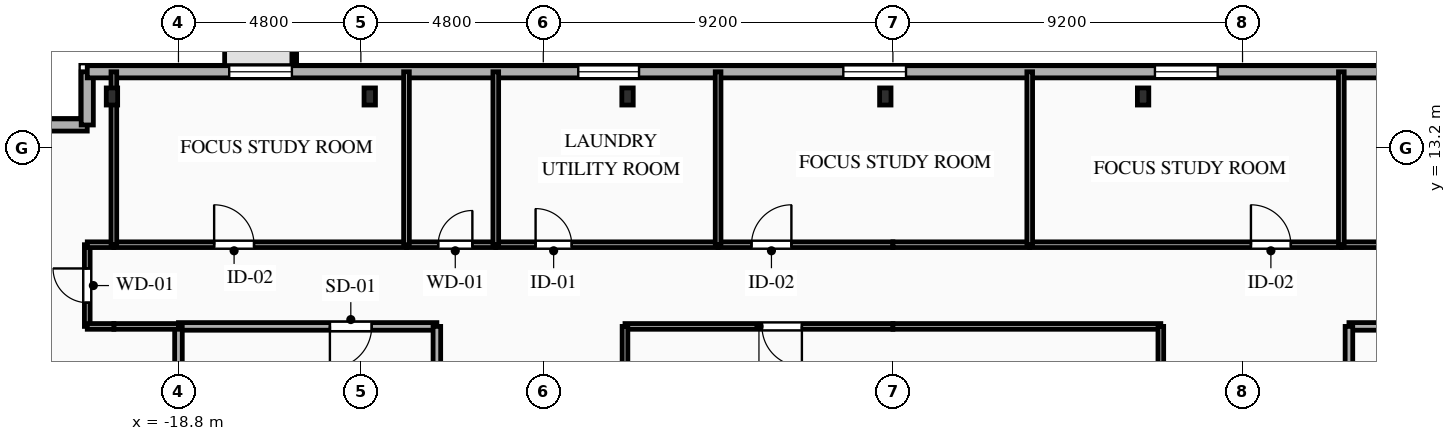
"""IFC4 building model, lengths in metres.
Left out: names, types, materials, properties, quantities, classifications, styles, units other than length and angle.
Written with IfcOpenShell. Run it as: python <this file> out.ifc"""

import sys

from ifc_helpers import new_model, si_unit, direction, frame, frame_2d, origin, origin_2d, place, context, subcontext, project, spatial, rectangle, i_section, extrude, element, fill, save


model = new_model("IFC4")
c1 = context("Model", 3, precision=1e-05, world=origin(), true_north=direction((0.0, 1.0)))
c2 = subcontext(c1, "Body", "Model", "MODEL_VIEW")
j1 = project(units=[si_unit("LENGTHUNIT", "METRE"), si_unit("PLANEANGLEUNIT", "RADIAN")], contexts=[c1])
p1 = place(None, origin())
s1 = spatial("IfcSite", under=j1, at=p1, CompositionType="ELEMENT")
p2 = place(p1, origin())
s2 = spatial("IfcBuilding", under=s1, at=p2, CompositionType="ELEMENT")
p3 = place(p2, frame((0.0, 0.0, 251.75)))
s3 = spatial("IfcBuildingStorey", under=s2, at=p3, CompositionType="ELEMENT", Elevation=251.75)
for number, where, z_axis, x_axis in (
    (1, (6.583, 14.55, 0.0), (0.0, 0.0, 1.0), (1.0, 0.0, 0.0)),
    (2, (-0.2, 14.55, 0.0), (0.0, 0.0, 1.0), (1.0, 0.0, 0.0)),
    (3, (-6.983, 14.55, 0.0), (0.0, 0.0, 1.0), (1.0, 0.0, 0.0)),
    (4, (-13.767, 14.55, 0.0), (0.0, 0.0, 1.0), (1.0, 0.0, 0.0)),
    (5, (-20.55, 14.55, 0.0), (0.0, 0.0, 1.0), (1.0, 0.0, 0.0)),
):
    element("IfcColumn", number, at=place(p3, frame(where, z_axis=z_axis, x_axis=x_axis)), inside=s3, PredefinedType="COLUMN", context=c2, shape_type="SweptSolid", body=[
        extrude(i_section(OverallWidth=0.3, OverallDepth=0.45, WebThickness=0.014, FlangeThickness=0.026, FilletRadius=0.027, at=origin_2d()), origin(), (0.0, 0.0, 1.0), 3.35),
    ])
p4 = place(p3, frame((-22.6, 13.8, 0.0), z_axis=(0.0, 0.0, 1.0), x_axis=(1.0, 0.0, 0.0)))
e6 = element("IfcWall", 6, at=p4, inside=s3, PredefinedType="SOLIDWALL", context=c2, shape_type="SweptSolid", body=[
    extrude(rectangle(XDim=1.4, YDim=0.32, at=frame_2d((0.7, 0.0))), origin(), (0.0, 0.0, 1.0), 3.04),
])
p5 = place(p3, frame((-21.2, 13.8, 0.0), z_axis=(0.0, 0.0, 1.0), x_axis=(0.0, 1.0, 0.0)))
e7 = element("IfcWall", 7, at=p5, inside=s3, PredefinedType="SOLIDWALL", context=c2, shape_type="SweptSolid", body=[
    extrude(rectangle(XDim=1.4, YDim=0.32, at=frame_2d((0.7, 0.0))), origin(), (0.0, 0.0, 1.0), 3.04),
])
p6 = place(p3, frame((-21.2, 15.2, 0.0), z_axis=(0.0, 0.0, 1.0), x_axis=(1.0, 0.0, 0.0)))
e8 = element("IfcWall", 8, at=p6, inside=s3, PredefinedType="SOLIDWALL", context=c2, shape_type="SweptSolid", body=[
    extrude(rectangle(XDim=42.0, YDim=0.32, at=frame_2d((21.0, 0.0))), origin(), (0.0, 0.0, 1.0), 3.04),
])
p7 = place(p6, frame((3.735, 0.0, 0.85)))
e9 = element("IfcOpeningElement", 9, at=p7, cuts=e8, PredefinedType="OPENING", context=c2, shape_type="SweptSolid", body=[
    extrude(rectangle(XDim=1.65, YDim=1.85, at=frame_2d((0.825, 0.925))), frame((0.0, 0.17, 0.0), z_axis=(0.0, -1.0, 0.0), x_axis=(1.0, 0.0, 0.0)), (0.0, 0.0, 1.0), 0.34),
])
p8 = place(p6, frame((12.92, 0.0, 0.85)))
e10 = element("IfcOpeningElement", 10, at=p8, cuts=e8, PredefinedType="OPENING", context=c2, shape_type="SweptSolid", body=[
    extrude(rectangle(XDim=1.6, YDim=1.85, at=frame_2d((0.8, 0.925))), frame((0.0, 0.17, 0.0), z_axis=(0.0, -1.0, 0.0), x_axis=(1.0, 0.0, 0.0)), (0.0, 0.0, 1.0), 0.34),
])
p9 = place(p6, frame((19.895, 0.0, 0.85)))
e11 = element("IfcOpeningElement", 11, at=p9, cuts=e8, PredefinedType="OPENING", context=c2, shape_type="SweptSolid", body=[
    extrude(rectangle(XDim=1.65, YDim=1.85, at=frame_2d((0.825, 0.925))), frame((0.0, 0.17, 0.0), z_axis=(0.0, -1.0, 0.0), x_axis=(1.0, 0.0, 0.0)), (0.0, 0.0, 1.0), 0.34),
])
p10 = place(p6, frame((28.095, 0.0, 0.85)))
e12 = element("IfcOpeningElement", 12, at=p10, cuts=e8, PredefinedType="OPENING", context=c2, shape_type="SweptSolid", body=[
    extrude(rectangle(XDim=1.65, YDim=1.85, at=frame_2d((0.825, 0.925))), frame((0.0, 0.17, 0.0), z_axis=(0.0, -1.0, 0.0), x_axis=(1.0, 0.0, 0.0)), (0.0, 0.0, 1.0), 0.34),
])
p11 = place(p6, frame((36.495, 0.0, 0.85)))
e13 = element("IfcOpeningElement", 13, at=p11, cuts=e8, PredefinedType="OPENING", context=c2, shape_type="SweptSolid", body=[
    extrude(rectangle(XDim=1.65, YDim=1.85, at=frame_2d((0.825, 0.925))), frame((0.0, 0.17, 0.0), z_axis=(0.0, -1.0, 0.0), x_axis=(1.0, 0.0, 0.0)), (0.0, 0.0, 1.0), 0.34),
])
p12 = place(p3, frame((-12.0, 8.5, 0.0), z_axis=(0.0, 0.0, 1.0), x_axis=(-1.0, 0.0, 0.0)))
e14 = element("IfcWall", 14, at=p12, inside=s3, PredefinedType="PARTITIONING", context=c2, shape_type="SweptSolid", body=[
    extrude(rectangle(XDim=6.8, YDim=0.2, at=frame_2d((3.4, 0.0))), origin(), (0.0, 0.0, 1.0), 3.04),
])
p13 = place(p12, frame((1.715, 0.0, 0.0)))
e15 = element("IfcOpeningElement", 15, at=p13, cuts=e14, PredefinedType="OPENING", context=c2, shape_type="SweptSolid", body=[
    extrude(rectangle(XDim=1.1, YDim=2.15, at=frame_2d((0.55, 1.075))), frame((0.0, 0.11, 0.0), z_axis=(0.0, -1.0, 0.0), x_axis=(1.0, 0.0, 0.0)), (0.0, 0.0, 1.0), 0.22),
])
p14 = place(p3, frame((-12.0, 5.6, 0.0), z_axis=(0.0, 0.0, 1.0), x_axis=(0.0, 1.0, 0.0)))
e16 = element("IfcWall", 16, at=p14, inside=s3, PredefinedType="PARTITIONING", context=c2, shape_type="SweptSolid", body=[
    extrude(rectangle(XDim=2.9, YDim=0.2, at=frame_2d((1.45, 0.0))), origin(), (0.0, 0.0, 1.0), 3.04),
])
p15 = place(p3, frame((-18.8, 8.5, 0.0), z_axis=(0.0, 0.0, 1.0), x_axis=(0.0, -1.0, 0.0)))
e17 = element("IfcWall", 17, at=p15, inside=s3, PredefinedType="PARTITIONING", context=c2, shape_type="SweptSolid", body=[
    extrude(rectangle(XDim=2.9, YDim=0.2, at=frame_2d((1.45, 0.0))), origin(), (0.0, 0.0, 1.0), 2.665),
])
p16 = place(p3, frame((18.8, 8.5, 0.0), z_axis=(0.0, 0.0, 1.0), x_axis=(-1.0, 0.0, 0.0)))
e18 = element("IfcWall", 18, at=p16, inside=s3, PredefinedType="PARTITIONING", context=c2, shape_type="SweptSolid", body=[
    extrude(rectangle(XDim=6.8, YDim=0.2, at=frame_2d((3.4, 0.0))), origin(), (0.0, 0.0, 1.0), 3.04),
])
p17 = place(p16, frame((3.985, 0.0, 0.0)))
e19 = element("IfcOpeningElement", 19, at=p17, cuts=e18, PredefinedType="OPENING", context=c2, shape_type="SweptSolid", body=[
    extrude(rectangle(XDim=1.1, YDim=2.15, at=frame_2d((0.55, 1.075))), frame((0.0, 0.11, 0.0), z_axis=(0.0, -1.0, 0.0), x_axis=(1.0, 0.0, 0.0)), (0.0, 0.0, 1.0), 0.22),
])
p18 = place(p3, frame((12.0, 8.5, 0.0), z_axis=(0.0, 0.0, 1.0), x_axis=(0.0, -1.0, 0.0)))
e20 = element("IfcWall", 20, at=p18, inside=s3, PredefinedType="PARTITIONING", context=c2, shape_type="SweptSolid", body=[
    extrude(rectangle(XDim=2.9, YDim=0.2, at=frame_2d((1.45, 0.0))), origin(), (0.0, 0.0, 1.0), 3.04),
])
p19 = place(p3, frame((-21.2, 8.5, 0.0), z_axis=(0.0, 0.0, 1.0), x_axis=(0.0, 1.0, 0.0)))
e21 = element("IfcWall", 21, at=p19, inside=s3, PredefinedType="PARTITIONING", context=c2, shape_type="SweptSolid", body=[
    extrude(rectangle(XDim=2.15, YDim=0.15, at=frame_2d((1.075, 0.0))), origin(), (0.0, 0.0, 1.0), 2.695),
])
p20 = place(p19, frame((0.625, 0.0, 0.0)))
e22 = element("IfcOpeningElement", 22, at=p20, cuts=e21, PredefinedType="OPENING", context=c2, shape_type="SweptSolid", body=[
    extrude(rectangle(XDim=0.9, YDim=2.1, at=frame_2d((0.45, 1.05))), frame((0.0, 0.085, 0.0), z_axis=(0.0, -1.0, 0.0), x_axis=(1.0, 0.0, 0.0)), (0.0, 0.0, 1.0), 0.17),
])
p21 = place(p3, frame((-18.8, 8.5, 0.0), z_axis=(0.0, 0.0, 1.0), x_axis=(-1.0, 0.0, 0.0)))
e23 = element("IfcWall", 23, at=p21, inside=s3, PredefinedType="PARTITIONING", context=c2, shape_type="SweptSolid", body=[
    extrude(rectangle(XDim=1.7, YDim=0.15, at=frame_2d((0.85, 0.0))), origin(), (0.0, 0.0, 1.0), 3.04),
])
for number, where, z_axis, x_axis in (
    (24, (-20.5, 8.5, 0.0), (0.0, 0.0, 1.0), (-1.0, 0.0, 0.0)),
    (25, (-21.2, 10.65, 0.0), (0.0, 0.0, 1.0), (1.0, 0.0, 0.0)),
):
    element("IfcWall", number, at=place(p3, frame(where, z_axis=z_axis, x_axis=x_axis)), inside=s3, PredefinedType="PARTITIONING", context=c2, shape_type="SweptSolid", body=[
        extrude(rectangle(XDim=0.7, YDim=0.15, at=frame_2d((0.35, 0.0))), origin(), (0.0, 0.0, 1.0), 3.04),
    ])
p22 = place(p3, frame((-20.5, 10.65, 0.0), z_axis=(0.0, 0.0, 1.0), x_axis=(1.0, 0.0, 0.0)))
e26 = element("IfcWall", 26, at=p22, inside=s3, PredefinedType="PARTITIONING", context=c2, shape_type="SweptSolid", body=[
    extrude(rectangle(XDim=7.7, YDim=0.15, at=frame_2d((3.85, 0.0))), origin(), (0.0, 0.0, 1.0), 3.04),
])
p23 = place(p22, frame((2.639, 0.0, 0.0)))
e27 = element("IfcOpeningElement", 27, at=p23, cuts=e26, PredefinedType="OPENING", context=c2, shape_type="SweptSolid", body=[
    extrude(rectangle(XDim=1.05, YDim=2.15, at=frame_2d((0.525, 1.075))), frame((0.0, 0.085, 0.0), z_axis=(0.0, -1.0, 0.0), x_axis=(1.0, 0.0, 0.0)), (0.0, 0.0, 1.0), 0.17),
])
p24 = place(p3, frame((-12.8, 10.65, 0.0), z_axis=(0.0, 0.0, 1.0), x_axis=(1.0, 0.0, 0.0)))
e28 = element("IfcWall", 28, at=p24, inside=s3, PredefinedType="PLUMBINGWALL", context=c2, shape_type="SweptSolid", body=[
    extrude(rectangle(XDim=2.35, YDim=0.15, at=frame_2d((1.175, 0.0))), origin(), (0.0, 0.0, 1.0), 3.04),
])
p25 = place(p24, frame((0.834, 0.0, 0.0)))
e29 = element("IfcOpeningElement", 29, at=p25, cuts=e28, PredefinedType="OPENING", context=c2, shape_type="SweptSolid", body=[
    extrude(rectangle(XDim=0.9, YDim=2.1, at=frame_2d((0.45, 1.05))), frame((0.0, 0.085, 0.0), z_axis=(0.0, -1.0, 0.0), x_axis=(1.0, 0.0, 0.0)), (0.0, 0.0, 1.0), 0.17),
])
p26 = place(p3, frame((-10.45, 10.65, 0.0), z_axis=(0.0, 0.0, 1.0), x_axis=(1.0, 0.0, 0.0)))
e30 = element("IfcWall", 30, at=p26, inside=s3, PredefinedType="PARTITIONING", context=c2, shape_type="SweptSolid", body=[
    extrude(rectangle(XDim=5.85, YDim=0.15, at=frame_2d((2.925, 0.0))), origin(), (0.0, 0.0, 1.0), 3.04),
])
p27 = place(p26, frame((1.048, 0.0, 0.0)))
e31 = element("IfcOpeningElement", 31, at=p27, cuts=e30, PredefinedType="OPENING", context=c2, shape_type="SweptSolid", body=[
    extrude(rectangle(XDim=0.95, YDim=2.1, at=frame_2d((0.475, 1.05))), frame((0.0, 0.085, 0.0), z_axis=(0.0, -1.0, 0.0), x_axis=(1.0, 0.0, 0.0)), (0.0, 0.0, 1.0), 0.17),
])
p28 = place(p3, frame((-4.6, 10.65, 0.0), z_axis=(0.0, 0.0, 1.0), x_axis=(1.0, 0.0, 0.0)))
e32 = element("IfcWall", 32, at=p28, inside=s3, PredefinedType="PARTITIONING", context=c2, shape_type="SweptSolid", body=[
    extrude(rectangle(XDim=4.6, YDim=0.15, at=frame_2d((2.3, 0.0))), origin(), (0.0, 0.0, 1.0), 3.04),
])
p29 = place(p28, frame((0.879, 0.0, 0.0)))
e33 = element("IfcOpeningElement", 33, at=p29, cuts=e32, PredefinedType="OPENING", context=c2, shape_type="SweptSolid", body=[
    extrude(rectangle(XDim=1.05, YDim=2.15, at=frame_2d((0.525, 1.075))), frame((0.0, 0.085, 0.0), z_axis=(0.0, -1.0, 0.0), x_axis=(1.0, 0.0, 0.0)), (0.0, 0.0, 1.0), 0.17),
])
p30 = place(p3, frame((0.0, 8.5, 0.0), z_axis=(0.0, 0.0, 1.0), x_axis=(-1.0, 0.0, 0.0)))
e34 = element("IfcWall", 34, at=p30, inside=s3, PredefinedType="PARTITIONING", context=c2, shape_type="SweptSolid", body=[
    extrude(rectangle(XDim=7.05, YDim=0.15, at=frame_2d((3.525, 0.0))), origin(), (0.0, 0.0, 1.0), 3.04),
])
p31 = place(p30, frame((2.395, 0.0, 0.0)))
e35 = element("IfcOpeningElement", 35, at=p31, cuts=e34, PredefinedType="OPENING", context=c2, shape_type="SweptSolid", body=[
    extrude(rectangle(XDim=1.05, YDim=2.15, at=frame_2d((0.525, 1.075))), frame((0.0, 0.085, 0.0), z_axis=(0.0, -1.0, 0.0), x_axis=(1.0, 0.0, 0.0)), (0.0, 0.0, 1.0), 0.17),
])
p32 = place(p3, frame((0.0, 10.65, 0.0), z_axis=(0.0, 0.0, 1.0), x_axis=(1.0, 0.0, 0.0)))
e36 = element("IfcWall", 36, at=p32, inside=s3, PredefinedType="PARTITIONING", context=c2, shape_type="SweptSolid", body=[
    extrude(rectangle(XDim=3.6, YDim=0.15, at=frame_2d((1.8, 0.0))), origin(), (0.0, 0.0, 1.0), 3.04),
])
p33 = place(p3, frame((3.6, 10.65, 0.0), z_axis=(0.0, 0.0, 1.0), x_axis=(1.0, 0.0, 0.0)))
e37 = element("IfcWall", 37, at=p33, inside=s3, PredefinedType="PARTITIONING", context=c2, shape_type="SweptSolid", body=[
    extrude(rectangle(XDim=8.2, YDim=0.15, at=frame_2d((4.1, 0.0))), origin(), (0.0, 0.0, 1.0), 3.04),
])
p34 = place(p33, frame((5.821, 0.0, 0.0)))
e38 = element("IfcOpeningElement", 38, at=p34, cuts=e37, PredefinedType="OPENING", context=c2, shape_type="SweptSolid", body=[
    extrude(rectangle(XDim=1.05, YDim=2.15, at=frame_2d((0.525, 1.075))), frame((0.0, 0.085, 0.0), z_axis=(0.0, -1.0, 0.0), x_axis=(1.0, 0.0, 0.0)), (0.0, 0.0, 1.0), 0.17),
])
p35 = place(p3, frame((11.8, 10.65, 0.0), z_axis=(0.0, 0.0, 1.0), x_axis=(1.0, 0.0, 0.0)))
e39 = element("IfcWall", 39, at=p35, inside=s3, PredefinedType="PARTITIONING", context=c2, shape_type="SweptSolid", body=[
    extrude(rectangle(XDim=8.7, YDim=0.15, at=frame_2d((4.35, 0.0))), origin(), (0.0, 0.0, 1.0), 3.04),
])
p36 = place(p35, frame((4.636, 0.0, 0.0)))
e40 = element("IfcOpeningElement", 40, at=p36, cuts=e39, PredefinedType="OPENING", context=c2, shape_type="SweptSolid", body=[
    extrude(rectangle(XDim=1.05, YDim=2.15, at=frame_2d((0.525, 1.075))), frame((0.0, 0.085, 0.0), z_axis=(0.0, -1.0, 0.0), x_axis=(1.0, 0.0, 0.0)), (0.0, 0.0, 1.0), 0.17),
])
for number, where, z_axis, x_axis in (
    (41, (7.05, 8.5, 0.0), (0.0, 0.0, 1.0), (-1.0, 0.0, 0.0)),
    (42, (-7.05, 8.5, 0.0), (0.0, 0.0, 1.0), (0.0, -1.0, 0.0)),
    (43, (7.05, 1.45, 0.0), (0.0, 0.0, 1.0), (0.0, 1.0, 0.0)),
):
    element("IfcWall", number, at=place(p3, frame(where, z_axis=z_axis, x_axis=x_axis)), inside=s3, PredefinedType="PARTITIONING", context=c2, shape_type="SweptSolid", body=[
        extrude(rectangle(XDim=7.05, YDim=0.15, at=frame_2d((3.525, 0.0))), origin(), (0.0, 0.0, 1.0), 3.04),
    ])
p37 = place(p3, frame((-20.5, 15.2, 0.0), z_axis=(0.0, 0.0, 1.0), x_axis=(0.0, -1.0, 0.0)))
e44 = element("IfcWall", 44, at=p37, inside=s3, PredefinedType="PARTITIONING", context=c2, shape_type="SweptSolid", body=[
    extrude(rectangle(XDim=4.55, YDim=0.15, at=frame_2d((2.275, 0.0))), origin(), (0.0, 0.0, 1.0), 2.665),
])
for number, where, z_axis, x_axis in (
    (45, (-12.8, 15.2, 0.0), (0.0, 0.0, 1.0), (0.0, -1.0, 0.0)),
    (46, (-10.45, 15.2, 0.0), (0.0, 0.0, 1.0), (0.0, -1.0, 0.0)),
):
    element("IfcWall", number, at=place(p3, frame(where, z_axis=z_axis, x_axis=x_axis)), inside=s3, PredefinedType="PLUMBINGWALL", context=c2, shape_type="SweptSolid", body=[
        extrude(rectangle(XDim=4.55, YDim=0.15, at=frame_2d((2.275, 0.0))), origin(), (0.0, 0.0, 1.0), 3.04),
    ])
for number, where, z_axis, x_axis in (
    (47, (-4.6, 15.2, 0.0), (0.0, 0.0, 1.0), (0.0, -1.0, 0.0)),
    (48, (3.6, 15.2, 0.0), (0.0, 0.0, 1.0), (0.0, -1.0, 0.0)),
    (49, (11.8, 15.2, 0.0), (0.0, 0.0, 1.0), (0.0, -1.0, 0.0)),
):
    element("IfcWall", number, at=place(p3, frame(where, z_axis=z_axis, x_axis=x_axis)), inside=s3, PredefinedType="PARTITIONING", context=c2, shape_type="SweptSolid", body=[
        extrude(rectangle(XDim=4.55, YDim=0.15, at=frame_2d((2.275, 0.0))), origin(), (0.0, 0.0, 1.0), 3.04),
    ])
p38 = place(p7, origin())
e50 = element("IfcWindow", 50, at=p38, inside=s3, PartitioningType="SINGLE_PANEL", PredefinedType="WINDOW", context=c2, shape_type="SweptSolid", body=[
    extrude(rectangle(XDim=1.65, YDim=1.85, at=frame_2d((0.825, 0.925))), frame((0.0, 0.03, 0.0), z_axis=(0.0, -1.0, 0.0), x_axis=(1.0, 0.0, 0.0)), (0.0, 0.0, 1.0), 0.06),
])
fill(e9, e50)
p39 = place(p8, origin())
e51 = element("IfcWindow", 51, at=p39, inside=s3, PartitioningType="SINGLE_PANEL", PredefinedType="WINDOW", context=c2, shape_type="SweptSolid", body=[
    extrude(rectangle(XDim=1.6, YDim=1.85, at=frame_2d((0.8, 0.925))), frame((0.0, 0.03, 0.0), z_axis=(0.0, -1.0, 0.0), x_axis=(1.0, 0.0, 0.0)), (0.0, 0.0, 1.0), 0.06),
])
fill(e10, e51)
p40 = place(p9, origin())
e52 = element("IfcWindow", 52, at=p40, inside=s3, PartitioningType="SINGLE_PANEL", PredefinedType="WINDOW", context=c2, shape_type="SweptSolid", body=[
    extrude(rectangle(XDim=1.65, YDim=1.85, at=frame_2d((0.825, 0.925))), frame((0.0, 0.03, 0.0), z_axis=(0.0, -1.0, 0.0), x_axis=(1.0, 0.0, 0.0)), (0.0, 0.0, 1.0), 0.06),
])
fill(e11, e52)
p41 = place(p10, origin())
e53 = element("IfcWindow", 53, at=p41, inside=s3, PartitioningType="SINGLE_PANEL", PredefinedType="WINDOW", context=c2, shape_type="SweptSolid", body=[
    extrude(rectangle(XDim=1.65, YDim=1.85, at=frame_2d((0.825, 0.925))), frame((0.0, 0.03, 0.0), z_axis=(0.0, -1.0, 0.0), x_axis=(1.0, 0.0, 0.0)), (0.0, 0.0, 1.0), 0.06),
])
fill(e12, e53)
p42 = place(p13, origin())
e54 = element("IfcDoor", 54, at=p42, inside=s3, OperationType="SINGLE_SWING_RIGHT", PredefinedType="DOOR", context=c2, shape_type="SweptSolid", body=[
    extrude(rectangle(XDim=1.1, YDim=2.15, at=frame_2d((0.55, 1.075))), frame((0.0, 0.025, 0.0), z_axis=(0.0, -1.0, 0.0), x_axis=(1.0, 0.0, 0.0)), (0.0, 0.0, 1.0), 0.05),
])
fill(e15, e54)
p43 = place(p20, origin())
e55 = element("IfcDoor", 55, at=p43, inside=s3, OperationType="SINGLE_SWING_RIGHT", PredefinedType="DOOR", context=c2, shape_type="SweptSolid", body=[
    extrude(rectangle(XDim=0.9, YDim=2.1, at=frame_2d((0.45, 1.05))), frame((0.0, 0.025, 0.0), z_axis=(0.0, -1.0, 0.0), x_axis=(1.0, 0.0, 0.0)), (0.0, 0.0, 1.0), 0.05),
])
fill(e22, e55)
p44 = place(p23, origin())
e56 = element("IfcDoor", 56, at=p44, inside=s3, OperationType="SINGLE_SWING_LEFT", PredefinedType="DOOR", context=c2, shape_type="SweptSolid", body=[
    extrude(rectangle(XDim=1.05, YDim=2.15, at=frame_2d((0.525, 1.075))), frame((0.0, 0.025, 0.0), z_axis=(0.0, -1.0, 0.0), x_axis=(1.0, 0.0, 0.0)), (0.0, 0.0, 1.0), 0.05),
])
fill(e27, e56)
p45 = place(p25, origin())
e57 = element("IfcDoor", 57, at=p45, inside=s3, OperationType="SINGLE_SWING_RIGHT", PredefinedType="DOOR", context=c2, shape_type="SweptSolid", body=[
    extrude(rectangle(XDim=0.9, YDim=2.1, at=frame_2d((0.45, 1.05))), frame((0.0, 0.025, 0.0), z_axis=(0.0, -1.0, 0.0), x_axis=(1.0, 0.0, 0.0)), (0.0, 0.0, 1.0), 0.05),
])
fill(e29, e57)
p46 = place(p27, origin())
e58 = element("IfcDoor", 58, at=p46, inside=s3, OperationType="SINGLE_SWING_LEFT", PredefinedType="DOOR", context=c2, shape_type="SweptSolid", body=[
    extrude(rectangle(XDim=0.95, YDim=2.1, at=frame_2d((0.475, 1.05))), frame((0.0, 0.025, 0.0), z_axis=(0.0, -1.0, 0.0), x_axis=(1.0, 0.0, 0.0)), (0.0, 0.0, 1.0), 0.05),
])
fill(e31, e58)
p47 = place(p29, origin())
e59 = element("IfcDoor", 59, at=p47, inside=s3, OperationType="SINGLE_SWING_RIGHT", PredefinedType="DOOR", context=c2, shape_type="SweptSolid", body=[
    extrude(rectangle(XDim=1.05, YDim=2.15, at=frame_2d((0.525, 1.075))), frame((0.0, 0.025, 0.0), z_axis=(0.0, -1.0, 0.0), x_axis=(1.0, 0.0, 0.0)), (0.0, 0.0, 1.0), 0.05),
])
fill(e33, e59)
p48 = place(p31, origin())
e60 = element("IfcDoor", 60, at=p48, inside=s3, OperationType="SINGLE_SWING_LEFT", PredefinedType="DOOR", context=c2, shape_type="SweptSolid", body=[
    extrude(rectangle(XDim=1.05, YDim=2.15, at=frame_2d((0.525, 1.075))), frame((0.0, 0.025, 0.0), z_axis=(0.0, -1.0, 0.0), x_axis=(1.0, 0.0, 0.0)), (0.0, 0.0, 1.0), 0.05),
])
fill(e35, e60)
p49 = place(p34, origin())
e61 = element("IfcDoor", 61, at=p49, inside=s3, OperationType="SINGLE_SWING_LEFT", PredefinedType="DOOR", context=c2, shape_type="SweptSolid", body=[
    extrude(rectangle(XDim=1.05, YDim=2.15, at=frame_2d((0.525, 1.075))), frame((0.0, 0.025, 0.0), z_axis=(0.0, -1.0, 0.0), x_axis=(1.0, 0.0, 0.0)), (0.0, 0.0, 1.0), 0.05),
])
fill(e38, e61)
save(model, sys.argv[1])
